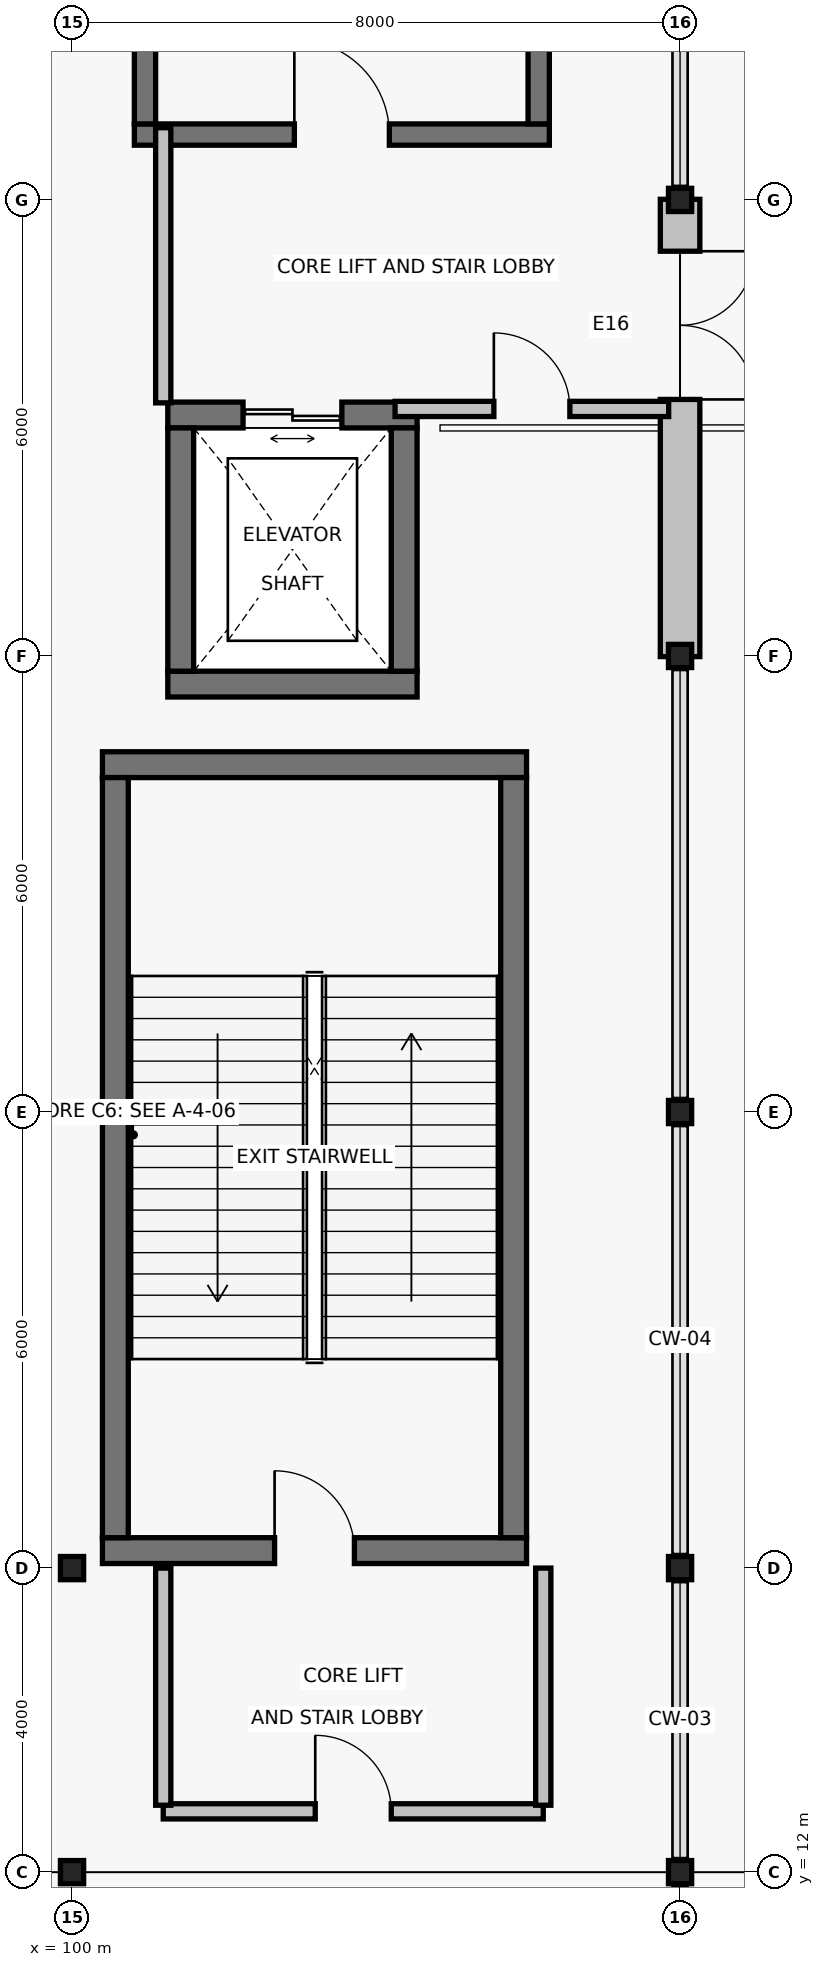
"""IFC4 building model, lengths in metres.
Left out: names, types, materials, properties, quantities, classifications, styles, units other than length and angle.
Written with IfcOpenShell. Run it as: python <this file> out.ifc"""

import sys

from ifc_helpers import new_model, si_unit, direction, frame, frame_2d, origin, origin_2d, place, context, subcontext, project, spatial, rectangle, hollow_rectangle, extrude, element, fill, save


model = new_model("IFC4")
c1 = context("Model", 3, precision=1e-05, world=origin(), true_north=direction((0.0, 1.0)))
c2 = subcontext(c1, "Body", "Model", "MODEL_VIEW")
j1 = project(units=[si_unit("LENGTHUNIT", "METRE"), si_unit("PLANEANGLEUNIT", "RADIAN")], contexts=[c1])
p1 = place(None, origin())
s1 = spatial("IfcSite", under=j1, at=p1, CompositionType="ELEMENT")
p2 = place(p1, origin())
s2 = spatial("IfcBuilding", under=s1, at=p2, CompositionType="ELEMENT")
p3 = place(p2, origin())
s3 = spatial("IfcBuildingStorey", under=s2, at=p3, CompositionType="ELEMENT", Elevation=0.0)
for number, where, z_axis, x_axis in (
    (1, (100.0, 12.0, 0.0), (0.0, 0.0, 1.0), (1.0, 0.0, 0.0)),
    (2, (100.0, 16.0, 0.0), (0.0, 0.0, 1.0), (1.0, 0.0, 0.0)),
    (3, (108.0, 12.0, 0.0), (0.0, 0.0, 1.0), (1.0, 0.0, 0.0)),
    (4, (108.0, 16.0, 0.0), (0.0, 0.0, 1.0), (1.0, 0.0, 0.0)),
    (5, (108.0, 22.0, 0.0), (0.0, 0.0, 1.0), (1.0, 0.0, 0.0)),
    (6, (108.0, 28.0, 0.0), (0.0, 0.0, 1.0), (1.0, 0.0, 0.0)),
    (7, (108.0, 34.0, 0.0), (0.0, 0.0, 1.0), (1.0, 0.0, 0.0)),
):
    element("IfcColumn", number, at=place(p3, frame(where, z_axis=z_axis, x_axis=x_axis)), inside=s3, PredefinedType="COLUMN", context=c2, shape_type="SweptSolid", body=[
        extrude(hollow_rectangle(XDim=0.305, YDim=0.305, WallThickness=0.013, InnerFilletRadius=0.013, OuterFilletRadius=0.025, at=origin_2d()), origin(), (0.0, 0.0, 1.0), 6.6),
    ])
p4 = place(p3, frame((108.0, 34.008, 0.0), z_axis=(0.0, 0.0, 1.0), x_axis=(0.0, -1.0, 0.0)))
e8 = element("IfcWall", 8, at=p4, inside=s3, PredefinedType="SOLIDWALL", context=c2, shape_type="SweptSolid", body=[
    extrude(rectangle(XDim=6.016, YDim=0.52, at=frame_2d((3.008, 0.0))), origin(), (0.0, 0.0, 1.0), 5.837),
])
p5 = place(p4, frame((0.683, 0.0, 0.0)))
e9 = element("IfcOpeningElement", 9, at=p5, cuts=e8, PredefinedType="OPENING", context=c2, shape_type="SweptSolid", body=[
    extrude(rectangle(XDim=1.95, YDim=2.4, at=frame_2d((0.975, 1.2))), frame((0.0, 0.275, 0.0), z_axis=(0.0, -1.0, 0.0), x_axis=(1.0, 0.0, 0.0)), (0.0, 0.0, 1.0), 0.55),
])
p6 = place(p3, frame((100.4, 16.23, 0.0), z_axis=(0.0, 0.0, 1.0), x_axis=(1.0, 0.0, 0.0)))
e10 = element("IfcWall", 10, at=p6, inside=s3, PredefinedType="SHEAR", context=c2, shape_type="SweptSolid", body=[
    extrude(rectangle(XDim=5.58, YDim=0.34, at=frame_2d((2.79, 0.0))), origin(), (0.0, 0.0, 1.0), 6.32),
])
p7 = place(p6, frame((2.265, 0.0, 0.0)))
e11 = element("IfcOpeningElement", 11, at=p7, cuts=e10, PredefinedType="OPENING", context=c2, shape_type="SweptSolid", body=[
    extrude(rectangle(XDim=1.05, YDim=2.15, at=frame_2d((0.525, 1.075))), frame((0.0, 0.185, 0.0), z_axis=(0.0, -1.0, 0.0), x_axis=(1.0, 0.0, 0.0)), (0.0, 0.0, 1.0), 0.37),
])
p8 = place(p3, frame((105.98, 26.57, 0.0), z_axis=(0.0, 0.0, 1.0), x_axis=(-1.0, 0.0, 0.0)))
e12 = element("IfcWall", 12, at=p8, inside=s3, PredefinedType="SHEAR", context=c2, shape_type="SweptSolid", body=[
    extrude(rectangle(XDim=5.58, YDim=0.34, at=frame_2d((2.79, 0.0))), origin(), (0.0, 0.0, 1.0), 6.32),
])
for number, where, z_axis, x_axis in (
    (13, (100.57, 26.4, 0.0), (0.0, 0.0, 1.0), (0.0, -1.0, 0.0)),
    (14, (105.81, 16.4, 0.0), (0.0, 0.0, 1.0), (0.0, 1.0, 0.0)),
):
    element("IfcWall", number, at=place(p3, frame(where, z_axis=z_axis, x_axis=x_axis)), inside=s3, PredefinedType="SHEAR", context=c2, shape_type="SweptSolid", body=[
        extrude(rectangle(XDim=10.0, YDim=0.34, at=frame_2d((5.0, 0.0))), origin(), (0.0, 0.0, 1.0), 6.32),
    ])
p9 = place(p3, frame((101.2, 12.8, 0.0), z_axis=(0.0, 0.0, 1.0), x_axis=(1.0, 0.0, 0.0)))
e15 = element("IfcWall", 15, at=p9, inside=s3, PredefinedType="PARTITIONING", context=c2, shape_type="SweptSolid", body=[
    extrude(rectangle(XDim=5.0, YDim=0.2, at=frame_2d((2.5, 0.0))), origin(), (0.0, 0.0, 1.0), 5.942),
])
p10 = place(p9, frame((2.0, 0.0, 0.0)))
e16 = element("IfcOpeningElement", 16, at=p10, cuts=e15, PredefinedType="OPENING", context=c2, shape_type="SweptSolid", body=[
    extrude(rectangle(XDim=1.0, YDim=2.15, at=frame_2d((0.5, 1.075))), frame((0.0, 0.115, 0.0), z_axis=(0.0, -1.0, 0.0), x_axis=(1.0, 0.0, 0.0)), (0.0, 0.0, 1.0), 0.23),
])
for number, where, z_axis, x_axis in (
    (17, (101.2, 16.0, 0.0), (0.0, 0.0, 1.0), (0.0, -1.0, 0.0)),
    (18, (106.2, 12.88, 0.0), (0.0, 0.0, 1.0), (0.0, 1.0, 0.0)),
):
    element("IfcWall", number, at=place(p3, frame(where, z_axis=z_axis, x_axis=x_axis)), inside=s3, PredefinedType="PARTITIONING", context=c2, shape_type="SweptSolid", body=[
        extrude(rectangle(XDim=3.12, YDim=0.2, at=frame_2d((1.56, 0.0))), origin(), (0.0, 0.0, 1.0), 5.689),
    ])
p11 = place(p3, frame((100.82, 34.86, 0.0), z_axis=(0.0, 0.0, 1.0), x_axis=(1.0, 0.0, 0.0)))
e19 = element("IfcWall", 19, at=p11, inside=s3, PredefinedType="SHEAR", context=c2, shape_type="SweptSolid", body=[
    extrude(rectangle(XDim=5.46, YDim=0.28, at=frame_2d((2.73, 0.0))), origin(), (0.0, 0.0, 1.0), 6.32),
])
p12 = place(p11, frame((2.105, 0.0, 0.0)))
e20 = element("IfcOpeningElement", 20, at=p12, cuts=e19, PredefinedType="OPENING", context=c2, shape_type="SweptSolid", body=[
    extrude(rectangle(XDim=1.25, YDim=2.2, at=frame_2d((0.625, 1.1))), frame((0.0, 0.155, 0.0), z_axis=(0.0, -1.0, 0.0), x_axis=(1.0, 0.0, 0.0)), (0.0, 0.0, 1.0), 0.31),
])
for number, where, z_axis, x_axis in (
    (21, (100.96, 45.0, 0.0), (0.0, 0.0, 1.0), (0.0, -1.0, 0.0)),
    (22, (106.14, 35.0, 0.0), (0.0, 0.0, 1.0), (0.0, 1.0, 0.0)),
):
    element("IfcWall", number, at=place(p3, frame(where, z_axis=z_axis, x_axis=x_axis)), inside=s3, PredefinedType="SHEAR", context=c2, shape_type="SweptSolid", body=[
        extrude(rectangle(XDim=10.0, YDim=0.28, at=frame_2d((5.0, 0.0))), origin(), (0.0, 0.0, 1.0), 6.32),
    ])
p13 = place(p3, frame((101.26, 27.63, 0.0), z_axis=(0.0, 0.0, 1.0), x_axis=(1.0, 0.0, 0.0)))
e23 = element("IfcWall", 23, at=p13, inside=s3, PredefinedType="SHEAR", context=c2, shape_type="SweptSolid", body=[
    extrude(rectangle(XDim=3.28, YDim=0.34, at=frame_2d((1.64, 0.0))), origin(), (0.0, 0.0, 1.0), 6.32),
])
p14 = place(p3, frame((104.54, 31.17, 0.0), z_axis=(0.0, 0.0, 1.0), x_axis=(-1.0, 0.0, 0.0)))
e24 = element("IfcWall", 24, at=p14, inside=s3, PredefinedType="SHEAR", context=c2, shape_type="SweptSolid", body=[
    extrude(rectangle(XDim=3.28, YDim=0.34, at=frame_2d((1.64, 0.0))), origin(), (0.0, 0.0, 1.0), 6.32),
])
p15 = place(p14, frame((0.99, 0.0, 0.0)))
e25 = element("IfcOpeningElement", 25, at=p15, cuts=e24, PredefinedType="OPENING", context=c2, shape_type="SweptSolid", body=[
    extrude(rectangle(XDim=1.3, YDim=2.25, at=frame_2d((0.65, 1.125))), frame((0.0, 0.185, 0.0), z_axis=(0.0, -1.0, 0.0), x_axis=(1.0, 0.0, 0.0)), (0.0, 0.0, 1.0), 0.37),
])
for number, where, z_axis, x_axis in (
    (26, (101.43, 31.0, 0.0), (0.0, 0.0, 1.0), (0.0, -1.0, 0.0)),
    (27, (104.37, 27.8, 0.0), (0.0, 0.0, 1.0), (0.0, 1.0, 0.0)),
):
    element("IfcWall", number, at=place(p3, frame(where, z_axis=z_axis, x_axis=x_axis)), inside=s3, PredefinedType="SHEAR", context=c2, shape_type="SweptSolid", body=[
        extrude(rectangle(XDim=3.2, YDim=0.34, at=frame_2d((1.6, 0.0))), origin(), (0.0, 0.0, 1.0), 6.32),
    ])
p16 = place(p3, frame((104.25, 31.25, 0.0), z_axis=(0.0, 0.0, 1.0), x_axis=(1.0, 0.0, 0.0)))
e28 = element("IfcWall", 28, at=p16, inside=s3, PredefinedType="PARTITIONING", context=c2, shape_type="SweptSolid", body=[
    extrude(rectangle(XDim=3.6, YDim=0.2, at=frame_2d((1.8, 0.0))), origin(), (0.0, 0.0, 1.0), 5.946),
])
p17 = place(p16, frame((1.3, 0.0, 0.0)))
e29 = element("IfcOpeningElement", 29, at=p17, cuts=e28, PredefinedType="OPENING", context=c2, shape_type="SweptSolid", body=[
    extrude(rectangle(XDim=1.0, YDim=2.15, at=frame_2d((0.5, 1.075))), frame((0.0, 0.115, 0.0), z_axis=(0.0, -1.0, 0.0), x_axis=(1.0, 0.0, 0.0)), (0.0, 0.0, 1.0), 0.23),
])
p18 = place(p3, frame((101.2, 34.95, 0.0), z_axis=(0.0, 0.0, 1.0), x_axis=(0.0, -1.0, 0.0)))
e30 = element("IfcWall", 30, at=p18, inside=s3, PredefinedType="PARTITIONING", context=c2, shape_type="SweptSolid", body=[
    extrude(rectangle(XDim=3.62, YDim=0.2, at=frame_2d((1.81, 0.0))), origin(), (0.0, 0.0, 1.0), 6.32),
])
p19 = place(p5, origin())
e31 = element("IfcDoor", 31, at=p19, inside=s3, OperationType="DOUBLE_DOOR_SINGLE_SWING", PredefinedType="DOOR", context=c2, shape_type="SweptSolid", body=[
    extrude(rectangle(XDim=1.95, YDim=2.4, at=frame_2d((0.975, 1.2))), frame((0.0, 0.025, 0.0), z_axis=(0.0, -1.0, 0.0), x_axis=(1.0, 0.0, 0.0)), (0.0, 0.0, 1.0), 0.05),
])
fill(e9, e31)
p20 = place(p7, origin())
e32 = element("IfcDoor", 32, at=p20, inside=s3, OperationType="SINGLE_SWING_LEFT", PredefinedType="DOOR", context=c2, shape_type="SweptSolid", body=[
    extrude(rectangle(XDim=1.05, YDim=2.15, at=frame_2d((0.525, 1.075))), frame((0.0, 0.025, 0.0), z_axis=(0.0, -1.0, 0.0), x_axis=(1.0, 0.0, 0.0)), (0.0, 0.0, 1.0), 0.05),
])
fill(e11, e32)
p21 = place(p10, origin())
e33 = element("IfcDoor", 33, at=p21, inside=s3, OperationType="SINGLE_SWING_LEFT", PredefinedType="DOOR", context=c2, shape_type="SweptSolid", body=[
    extrude(rectangle(XDim=1.0, YDim=2.15, at=frame_2d((0.5, 1.075))), frame((0.0, 0.025, 0.0), z_axis=(0.0, -1.0, 0.0), x_axis=(1.0, 0.0, 0.0)), (0.0, 0.0, 1.0), 0.05),
])
fill(e16, e33)
p22 = place(p12, origin())
e34 = element("IfcDoor", 34, at=p22, inside=s3, OperationType="SINGLE_SWING_LEFT", PredefinedType="DOOR", context=c2, shape_type="SweptSolid", body=[
    extrude(rectangle(XDim=1.25, YDim=2.2, at=frame_2d((0.625, 1.1))), frame((0.0, 0.025, 0.0), z_axis=(0.0, -1.0, 0.0), x_axis=(1.0, 0.0, 0.0)), (0.0, 0.0, 1.0), 0.05),
])
fill(e20, e34)
p23 = place(p15, origin())
e35 = element("IfcDoor", 35, at=p23, inside=s3, OperationType="DOUBLE_DOOR_SLIDING", PredefinedType="DOOR", context=c2, shape_type="SweptSolid", body=[
    extrude(rectangle(XDim=1.3, YDim=2.25, at=frame_2d((0.65, 1.125))), frame((0.0, 0.025, 0.0), z_axis=(0.0, -1.0, 0.0), x_axis=(1.0, 0.0, 0.0)), (0.0, 0.0, 1.0), 0.05),
])
fill(e25, e35)
p24 = place(p17, origin())
e36 = element("IfcDoor", 36, at=p24, inside=s3, OperationType="SINGLE_SWING_LEFT", PredefinedType="DOOR", context=c2, shape_type="SweptSolid", body=[
    extrude(rectangle(XDim=1.0, YDim=2.15, at=frame_2d((0.5, 1.075))), frame((0.0, 0.025, 0.0), z_axis=(0.0, -1.0, 0.0), x_axis=(1.0, 0.0, 0.0)), (0.0, 0.0, 1.0), 0.05),
])
fill(e29, e36)
save(model, sys.argv[1])
